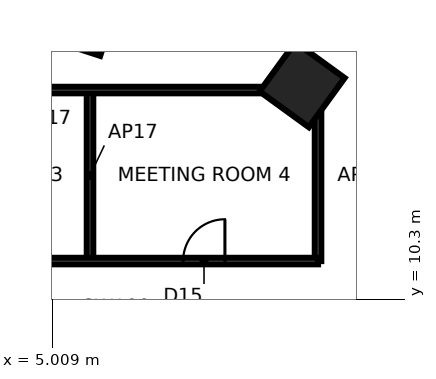
"""IFC4 building model, lengths in metres.
Left out: names, types, materials, properties, quantities, classifications, styles, units other than length and angle.
Written with IfcOpenShell. Run it as: python <this file> out.ifc"""

import sys

from ifc_helpers import new_model, si_unit, direction, frame, frame_2d, origin, origin_2d, place, context, subcontext, project, spatial, rectangle, extrude, element, fill, save


model = new_model("IFC4")
c1 = context("Model", 3, precision=1e-05, world=origin(), true_north=direction((0.0, 1.0)))
c2 = subcontext(c1, "Body", "Model", "MODEL_VIEW")
j1 = project(units=[si_unit("LENGTHUNIT", "METRE"), si_unit("PLANEANGLEUNIT", "RADIAN")], contexts=[c1])
p1 = place(None, origin())
s1 = spatial("IfcSite", under=j1, at=p1, CompositionType="ELEMENT")
p2 = place(p1, origin())
s2 = spatial("IfcBuilding", under=s1, at=p2, CompositionType="ELEMENT")
p3 = place(p2, frame((0.0, 0.0, 154.8)))
s3 = spatial("IfcBuildingStorey", under=s2, at=p3, CompositionType="ELEMENT", Elevation=154.8)
for number, where, z_axis, x_axis in (
    (1, (11.581, 15.94, 0.0), (0.0, 0.0, 1.0), (0.588, 0.809, 0.0)),
    (2, (5.754, 17.708, 0.0), (0.0, 0.0, 1.0), (0.309, 0.951, 0.0)),
):
    element("IfcColumn", number, at=place(p3, frame(where, z_axis=z_axis, x_axis=x_axis)), inside=s3, PredefinedType="COLUMN", context=c2, shape_type="SweptSolid", body=[
        extrude(rectangle(XDim=1.6, YDim=1.6, at=origin_2d()), origin(), (0.0, 0.0, 1.0), 3.9),
    ])
for number, where, z_axis, x_axis in (
    (3, (12.0, 15.8, 0.0), (0.0, 0.0, 1.0), (0.0, -1.0, 0.0)),
    (4, (6.0, 15.8, 0.0), (0.0, 0.0, 1.0), (0.0, -1.0, 0.0)),
):
    element("IfcWall", number, at=place(p3, frame(where, z_axis=z_axis, x_axis=x_axis)), inside=s3, PredefinedType="PARTITIONING", context=c2, shape_type="SweptSolid", body=[
        extrude(rectangle(XDim=4.5, YDim=0.17, at=frame_2d((2.25, 0.0))), origin(), (0.0, 0.0, 1.0), 3.74),
    ])
p4 = place(p3, frame((-12.0, 15.8, 0.0), z_axis=(0.0, 0.0, 1.0), x_axis=(1.0, 0.0, 0.0)))
e5 = element("IfcWall", 5, at=p4, inside=s3, PredefinedType="PARTITIONING", context=c2, shape_type="SweptSolid", body=[
    extrude(rectangle(XDim=24.0, YDim=0.17, at=frame_2d((12.0, 0.0))), origin(), (0.0, 0.0, 1.0), 3.74),
])
p5 = place(p4, frame((2.45, 0.0, 0.0)))
e6 = element("IfcOpeningElement", 6, at=p5, cuts=e5, PredefinedType="OPENING", context=c2, shape_type="SweptSolid", body=[
    extrude(rectangle(XDim=1.1, YDim=2.4, at=frame_2d((0.55, 1.2))), frame((0.0, 0.095, 0.0), z_axis=(0.0, -1.0, 0.0), x_axis=(1.0, 0.0, 0.0)), (0.0, 0.0, 1.0), 0.19),
])
p6 = place(p4, frame((8.45, 0.0, 0.0)))
e7 = element("IfcOpeningElement", 7, at=p6, cuts=e5, PredefinedType="OPENING", context=c2, shape_type="SweptSolid", body=[
    extrude(rectangle(XDim=1.1, YDim=2.4, at=frame_2d((0.55, 1.2))), frame((0.0, 0.095, 0.0), z_axis=(0.0, -1.0, 0.0), x_axis=(1.0, 0.0, 0.0)), (0.0, 0.0, 1.0), 0.19),
])
p7 = place(p3, frame((12.0, 11.3, 0.0), z_axis=(0.0, 0.0, 1.0), x_axis=(-1.0, 0.0, 0.0)))
e8 = element("IfcWall", 8, at=p7, inside=s3, PredefinedType="PARTITIONING", context=c2, shape_type="SweptSolid", body=[
    extrude(rectangle(XDim=24.0, YDim=0.17, at=frame_2d((12.0, 0.0))), origin(), (0.0, 0.0, 1.0), 3.74),
])
p8 = place(p7, frame((8.45, 0.0, 0.0)))
e9 = element("IfcOpeningElement", 9, at=p8, cuts=e8, PredefinedType="OPENING", context=c2, shape_type="SweptSolid", body=[
    extrude(rectangle(XDim=1.1, YDim=2.4, at=frame_2d((0.55, 1.2))), frame((0.0, 0.095, 0.0), z_axis=(0.0, -1.0, 0.0), x_axis=(1.0, 0.0, 0.0)), (0.0, 0.0, 1.0), 0.19),
])
p9 = place(p7, frame((2.45, 0.0, 0.0)))
e10 = element("IfcOpeningElement", 10, at=p9, cuts=e8, PredefinedType="OPENING", context=c2, shape_type="SweptSolid", body=[
    extrude(rectangle(XDim=1.1, YDim=2.4, at=frame_2d((0.55, 1.2))), frame((0.0, 0.095, 0.0), z_axis=(0.0, -1.0, 0.0), x_axis=(1.0, 0.0, 0.0)), (0.0, 0.0, 1.0), 0.19),
])
p10 = place(p9, frame((1.1, 0.0, 0.0), z_axis=(0.0, 0.0, 1.0), x_axis=(-1.0, 0.0, 0.0)))
e11 = element("IfcDoor", 11, at=p10, inside=s3, OperationType="SINGLE_SWING_RIGHT", PredefinedType="DOOR", context=c2, shape_type="SweptSolid", body=[
    extrude(rectangle(XDim=1.1, YDim=2.4, at=frame_2d((0.55, 1.2))), frame((0.0, 0.025, 0.0), z_axis=(0.0, -1.0, 0.0), x_axis=(1.0, 0.0, 0.0)), (0.0, 0.0, 1.0), 0.05),
])
fill(e10, e11)
save(model, sys.argv[1])
